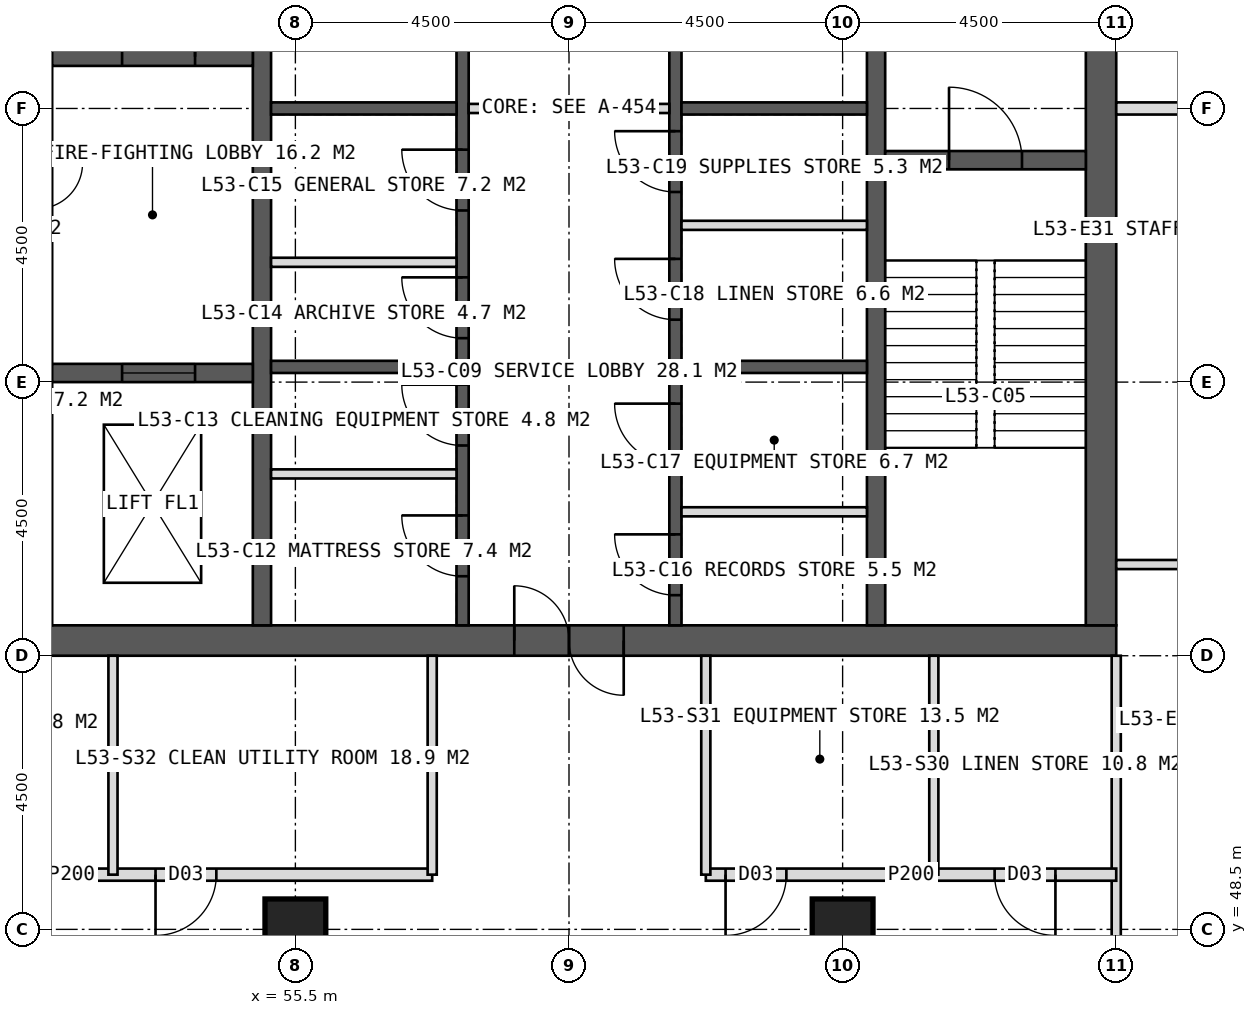
"""IFC4 building model, lengths in metres.
Left out: names, types, materials, properties, quantities, classifications, styles, units other than length and angle.
Written with IfcOpenShell. Run it as: python <this file> out.ifc"""

import sys

from ifc_helpers import new_model, si_unit, direction, frame, frame_2d, origin, origin_2d, place, context, subcontext, project, spatial, rectangle, hollow_rectangle, extrude, element, fill, save


model = new_model("IFC4")
c1 = context("Model", 3, precision=1e-05, world=origin(), true_north=direction((0.0, 1.0)))
c2 = subcontext(c1, "Body", "Model", "MODEL_VIEW")
j1 = project(units=[si_unit("LENGTHUNIT", "METRE"), si_unit("PLANEANGLEUNIT", "RADIAN")], contexts=[c1])
p1 = place(None, origin())
s1 = spatial("IfcSite", under=j1, at=p1, CompositionType="ELEMENT")
p2 = place(p1, origin())
s2 = spatial("IfcBuilding", under=s1, at=p2, CompositionType="ELEMENT")
p3 = place(p2, frame((0.0, 0.0, 221.0)))
s3 = spatial("IfcBuildingStorey", under=s2, at=p3, CompositionType="ELEMENT", Elevation=221.0)
p4 = place(p3, frame((51.0, 53.25, 0.0), z_axis=(0.0, 0.0, 1.0), x_axis=(1.0, 0.0, 0.0)))
e1 = element("IfcWall", 1, at=p4, inside=s3, PredefinedType="SHEAR", context=c2, shape_type="SweptSolid", body=[
    extrude(rectangle(XDim=18.0, YDim=0.5, at=frame_2d((9.0, 0.0))), origin(), (0.0, 0.0, 1.0), 4.0),
])
p5 = place(p4, frame((8.1, 0.0, 0.0)))
e2 = element("IfcOpeningElement", 2, at=p5, cuts=e1, PredefinedType="OPENING", context=c2, shape_type="SweptSolid", body=[
    extrude(rectangle(XDim=1.8, YDim=2.2, at=frame_2d((0.9, 1.1))), frame((0.0, 0.26, 0.0), z_axis=(0.0, -1.0, 0.0), x_axis=(1.0, 0.0, 0.0)), (0.0, 0.0, 1.0), 0.52),
])
p6 = place(p3, frame((68.75, 53.5, 0.0), z_axis=(0.0, 0.0, 1.0), x_axis=(0.0, 1.0, 0.0)))
e3 = element("IfcWall", 3, at=p6, inside=s3, PredefinedType="SHEAR", context=c2, shape_type="SweptSolid", body=[
    extrude(rectangle(XDim=17.0, YDim=0.5, at=frame_2d((8.5, 0.0))), origin(), (0.0, 0.0, 1.0), 4.0),
])
p7 = place(p6, frame((9.6, 0.0, 0.0)))
e4 = element("IfcOpeningElement", 4, at=p7, cuts=e3, PredefinedType="OPENING", context=c2, shape_type="SweptSolid", body=[
    extrude(rectangle(XDim=1.5, YDim=2.2, at=frame_2d((0.75, 1.1))), frame((0.0, 0.26, 0.0), z_axis=(0.0, -1.0, 0.0), x_axis=(1.0, 0.0, 0.0)), (0.0, 0.0, 1.0), 0.52),
])
for number, where, z_axis, x_axis in (
    (5, (54.95, 53.5, 0.0), (0.0, 0.0, 1.0), (0.0, 1.0, 0.0)),
    (6, (65.05, 53.5, 0.0), (0.0, 0.0, 1.0), (0.0, 1.0, 0.0)),
):
    element("IfcWall", number, at=place(p3, frame(where, z_axis=z_axis, x_axis=x_axis)), inside=s3, PredefinedType="SHEAR", context=c2, shape_type="SweptSolid", body=[
        extrude(rectangle(XDim=17.0, YDim=0.3, at=frame_2d((8.5, 0.0))), origin(), (0.0, 0.0, 1.0), 4.0),
    ])
p8 = place(p3, frame((58.25, 53.5, 0.0), z_axis=(0.0, 0.0, 1.0), x_axis=(0.0, 1.0, 0.0)))
e7 = element("IfcWall", 7, at=p8, inside=s3, PredefinedType="SHEAR", context=c2, shape_type="SweptSolid", body=[
    extrude(rectangle(XDim=17.0, YDim=0.2, at=frame_2d((8.5, 0.0))), origin(), (0.0, 0.0, 1.0), 4.0),
])
p9 = place(p8, frame((0.808, 0.0, 0.0)))
e8 = element("IfcOpeningElement", 8, at=p9, cuts=e7, PredefinedType="OPENING", context=c2, shape_type="SweptSolid", body=[
    extrude(rectangle(XDim=1.0, YDim=2.1, at=frame_2d((0.5, 1.05))), frame((0.0, 0.11, 0.0), z_axis=(0.0, -1.0, 0.0), x_axis=(1.0, 0.0, 0.0)), (0.0, 0.0, 1.0), 0.22),
])
p10 = place(p8, frame((2.958, 0.0, 0.0)))
e9 = element("IfcOpeningElement", 9, at=p10, cuts=e7, PredefinedType="OPENING", context=c2, shape_type="SweptSolid", body=[
    extrude(rectangle(XDim=1.0, YDim=2.1, at=frame_2d((0.5, 1.05))), frame((0.0, 0.11, 0.0), z_axis=(0.0, -1.0, 0.0), x_axis=(1.0, 0.0, 0.0)), (0.0, 0.0, 1.0), 0.22),
])
p11 = place(p8, frame((4.722, 0.0, 0.0)))
e10 = element("IfcOpeningElement", 10, at=p11, cuts=e7, PredefinedType="OPENING", context=c2, shape_type="SweptSolid", body=[
    extrude(rectangle(XDim=1.0, YDim=2.1, at=frame_2d((0.5, 1.05))), frame((0.0, 0.11, 0.0), z_axis=(0.0, -1.0, 0.0), x_axis=(1.0, 0.0, 0.0)), (0.0, 0.0, 1.0), 0.22),
])
p12 = place(p8, frame((6.823, 0.0, 0.0)))
e11 = element("IfcOpeningElement", 11, at=p12, cuts=e7, PredefinedType="OPENING", context=c2, shape_type="SweptSolid", body=[
    extrude(rectangle(XDim=1.0, YDim=2.1, at=frame_2d((0.5, 1.05))), frame((0.0, 0.11, 0.0), z_axis=(0.0, -1.0, 0.0), x_axis=(1.0, 0.0, 0.0)), (0.0, 0.0, 1.0), 0.22),
])
p13 = place(p8, frame((10.025, 0.0, 0.0)))
e12 = element("IfcOpeningElement", 12, at=p13, cuts=e7, PredefinedType="OPENING", context=c2, shape_type="SweptSolid", body=[
    extrude(rectangle(XDim=1.4, YDim=2.2, at=frame_2d((0.7, 1.1))), frame((0.0, 0.11, 0.0), z_axis=(0.0, -1.0, 0.0), x_axis=(1.0, 0.0, 0.0)), (0.0, 0.0, 1.0), 0.22),
])
p14 = place(p8, frame((14.325, 0.0, 0.0)))
e13 = element("IfcOpeningElement", 13, at=p14, cuts=e7, PredefinedType="OPENING", context=c2, shape_type="SweptSolid", body=[
    extrude(rectangle(XDim=1.4, YDim=2.2, at=frame_2d((0.7, 1.1))), frame((0.0, 0.11, 0.0), z_axis=(0.0, -1.0, 0.0), x_axis=(1.0, 0.0, 0.0)), (0.0, 0.0, 1.0), 0.22),
])
p15 = place(p3, frame((61.75, 53.5, 0.0), z_axis=(0.0, 0.0, 1.0), x_axis=(0.0, 1.0, 0.0)))
e14 = element("IfcWall", 14, at=p15, inside=s3, PredefinedType="SHEAR", context=c2, shape_type="SweptSolid", body=[
    extrude(rectangle(XDim=17.0, YDim=0.2, at=frame_2d((8.5, 0.0))), origin(), (0.0, 0.0, 1.0), 4.0),
])
p16 = place(p15, frame((0.496, 0.0, 0.0)))
e15 = element("IfcOpeningElement", 15, at=p16, cuts=e14, PredefinedType="OPENING", context=c2, shape_type="SweptSolid", body=[
    extrude(rectangle(XDim=1.0, YDim=2.1, at=frame_2d((0.5, 1.05))), frame((0.0, 0.11, 0.0), z_axis=(0.0, -1.0, 0.0), x_axis=(1.0, 0.0, 0.0)), (0.0, 0.0, 1.0), 0.22),
])
p17 = place(p15, frame((2.646, 0.0, 0.0)))
e16 = element("IfcOpeningElement", 16, at=p17, cuts=e14, PredefinedType="OPENING", context=c2, shape_type="SweptSolid", body=[
    extrude(rectangle(XDim=1.0, YDim=2.1, at=frame_2d((0.5, 1.05))), frame((0.0, 0.11, 0.0), z_axis=(0.0, -1.0, 0.0), x_axis=(1.0, 0.0, 0.0)), (0.0, 0.0, 1.0), 0.22),
])
p18 = place(p15, frame((5.027, 0.0, 0.0)))
e17 = element("IfcOpeningElement", 17, at=p18, cuts=e14, PredefinedType="OPENING", context=c2, shape_type="SweptSolid", body=[
    extrude(rectangle(XDim=1.0, YDim=2.1, at=frame_2d((0.5, 1.05))), frame((0.0, 0.11, 0.0), z_axis=(0.0, -1.0, 0.0), x_axis=(1.0, 0.0, 0.0)), (0.0, 0.0, 1.0), 0.22),
])
p19 = place(p15, frame((7.126, 0.0, 0.0)))
e18 = element("IfcOpeningElement", 18, at=p19, cuts=e14, PredefinedType="OPENING", context=c2, shape_type="SweptSolid", body=[
    extrude(rectangle(XDim=1.0, YDim=2.1, at=frame_2d((0.5, 1.05))), frame((0.0, 0.11, 0.0), z_axis=(0.0, -1.0, 0.0), x_axis=(1.0, 0.0, 0.0)), (0.0, 0.0, 1.0), 0.22),
])
p20 = place(p15, frame((10.025, 0.0, 0.0)))
e19 = element("IfcOpeningElement", 19, at=p20, cuts=e14, PredefinedType="OPENING", context=c2, shape_type="SweptSolid", body=[
    extrude(rectangle(XDim=1.4, YDim=2.2, at=frame_2d((0.7, 1.1))), frame((0.0, 0.11, 0.0), z_axis=(0.0, -1.0, 0.0), x_axis=(1.0, 0.0, 0.0)), (0.0, 0.0, 1.0), 0.22),
])
p21 = place(p15, frame((14.325, 0.0, 0.0)))
e20 = element("IfcOpeningElement", 20, at=p21, cuts=e14, PredefinedType="OPENING", context=c2, shape_type="SweptSolid", body=[
    extrude(rectangle(XDim=1.4, YDim=2.2, at=frame_2d((0.7, 1.1))), frame((0.0, 0.11, 0.0), z_axis=(0.0, -1.0, 0.0), x_axis=(1.0, 0.0, 0.0)), (0.0, 0.0, 1.0), 0.22),
])
for number, where, z_axis, x_axis in (
    (21, (55.1, 57.75, 0.0), (0.0, 0.0, 1.0), (1.0, 0.0, 0.0)),
    (22, (61.85, 57.75, 0.0), (0.0, 0.0, 1.0), (1.0, 0.0, 0.0)),
    (23, (55.1, 62.0, 0.0), (0.0, 0.0, 1.0), (1.0, 0.0, 0.0)),
    (24, (61.85, 62.0, 0.0), (0.0, 0.0, 1.0), (1.0, 0.0, 0.0)),
):
    element("IfcWall", number, at=place(p3, frame(where, z_axis=z_axis, x_axis=x_axis)), inside=s3, PredefinedType="SHEAR", context=c2, shape_type="SweptSolid", body=[
        extrude(rectangle(XDim=3.05, YDim=0.2, at=frame_2d((1.525, 0.0))), origin(), (0.0, 0.0, 1.0), 4.0),
    ])
p22 = place(p3, frame((51.5, 62.85, 0.0), z_axis=(0.0, 0.0, 1.0), x_axis=(1.0, 0.0, 0.0)))
e25 = element("IfcWall", 25, at=p22, inside=s3, PredefinedType="SHEAR", context=c2, shape_type="SweptSolid", body=[
    extrude(rectangle(XDim=3.3, YDim=0.3, at=frame_2d((1.65, 0.0))), origin(), (0.0, 0.0, 1.0), 4.0),
])
p23 = place(p22, frame((1.15, 0.0, 0.0)))
e26 = element("IfcOpeningElement", 26, at=p23, cuts=e25, PredefinedType="OPENING", context=c2, shape_type="SweptSolid", body=[
    extrude(rectangle(XDim=1.2, YDim=2.1, at=frame_2d((0.6, 1.05))), frame((0.0, 0.16, 0.0), z_axis=(0.0, -1.0, 0.0), x_axis=(1.0, 0.0, 0.0)), (0.0, 0.0, 1.0), 0.32),
])
p24 = place(p3, frame((51.5, 57.65, 0.0), z_axis=(0.0, 0.0, 1.0), x_axis=(1.0, 0.0, 0.0)))
e27 = element("IfcWall", 27, at=p24, inside=s3, PredefinedType="SHEAR", context=c2, shape_type="SweptSolid", body=[
    extrude(rectangle(XDim=3.3, YDim=0.3, at=frame_2d((1.65, 0.0))), origin(), (0.0, 0.0, 1.0), 4.0),
])
p25 = place(p24, frame((1.15, 0.0, 0.0)))
e28 = element("IfcOpeningElement", 28, at=p25, cuts=e27, PredefinedType="OPENING", context=c2, shape_type="SweptSolid", body=[
    extrude(rectangle(XDim=1.2, YDim=2.2, at=frame_2d((0.6, 1.1))), frame((0.0, 0.16, 0.0), z_axis=(0.0, -1.0, 0.0), x_axis=(1.0, 0.0, 0.0)), (0.0, 0.0, 1.0), 0.32),
])
p26 = place(p3, frame((65.2, 61.15, 0.0), z_axis=(0.0, 0.0, 1.0), x_axis=(1.0, 0.0, 0.0)))
e29 = element("IfcWall", 29, at=p26, inside=s3, PredefinedType="SHEAR", context=c2, shape_type="SweptSolid", body=[
    extrude(rectangle(XDim=3.3, YDim=0.3, at=frame_2d((1.65, 0.0))), origin(), (0.0, 0.0, 1.0), 4.0),
])
p27 = place(p26, frame((1.05, 0.0, 0.0)))
e30 = element("IfcOpeningElement", 30, at=p27, cuts=e29, PredefinedType="OPENING", context=c2, shape_type="SweptSolid", body=[
    extrude(rectangle(XDim=1.2, YDim=2.1, at=frame_2d((0.6, 1.05))), frame((0.0, 0.16, 0.0), z_axis=(0.0, -1.0, 0.0), x_axis=(1.0, 0.0, 0.0)), (0.0, 0.0, 1.0), 0.32),
])
for number, where, z_axis, x_axis in (
    (31, (55.5, 48.5, 0.0), (0.0, 0.0, 1.0), (1.0, 0.0, 0.0)),
    (32, (64.5, 48.5, 0.0), (0.0, 0.0, 1.0), (1.0, 0.0, 0.0)),
):
    element("IfcColumn", number, at=place(p3, frame(where, z_axis=z_axis, x_axis=x_axis)), inside=s3, PredefinedType="COLUMN", context=c2, shape_type="SweptSolid", body=[
        extrude(hollow_rectangle(XDim=1.0, YDim=1.0, WallThickness=0.1, at=origin_2d()), origin(), (0.0, 0.0, 1.0), 4.0),
    ])
p28 = place(p3, frame((69.0, 53.0, 0.0), z_axis=(0.0, 0.0, 1.0), x_axis=(0.0, -1.0, 0.0)))
e33 = element("IfcWall", 33, at=p28, inside=s3, PredefinedType="PARTITIONING", context=c2, shape_type="SweptSolid", body=[
    extrude(rectangle(XDim=5.1, YDim=0.15, at=frame_2d((2.55, 0.0))), origin(), (0.0, 0.0, 1.0), 3.75),
])
p29 = place(p3, frame((69.0, 49.4, 0.0), z_axis=(0.0, 0.0, 1.0), x_axis=(-1.0, 0.0, 0.0)))
e34 = element("IfcWall", 34, at=p29, inside=s3, PredefinedType="PARTITIONING", context=c2, shape_type="SweptSolid", body=[
    extrude(rectangle(XDim=6.75, YDim=0.2, at=frame_2d((3.375, 0.0))), origin(), (0.0, 0.0, 1.0), 3.75),
])
p30 = place(p29, frame((1.0, 0.0, 0.0)))
e35 = element("IfcOpeningElement", 35, at=p30, cuts=e34, PredefinedType="OPENING", context=c2, shape_type="SweptSolid", body=[
    extrude(rectangle(XDim=1.0, YDim=2.1, at=frame_2d((0.5, 1.05))), frame((0.0, 0.11, 0.0), z_axis=(0.0, -1.0, 0.0), x_axis=(1.0, 0.0, 0.0)), (0.0, 0.0, 1.0), 0.22),
])
p31 = place(p29, frame((5.425, 0.0, 0.0)))
e36 = element("IfcOpeningElement", 36, at=p31, cuts=e34, PredefinedType="OPENING", context=c2, shape_type="SweptSolid", body=[
    extrude(rectangle(XDim=1.0, YDim=2.1, at=frame_2d((0.5, 1.05))), frame((0.0, 0.11, 0.0), z_axis=(0.0, -1.0, 0.0), x_axis=(1.0, 0.0, 0.0)), (0.0, 0.0, 1.0), 0.22),
])
p32 = place(p3, frame((57.75, 49.4, 0.0), z_axis=(0.0, 0.0, 1.0), x_axis=(-1.0, 0.0, 0.0)))
e37 = element("IfcWall", 37, at=p32, inside=s3, PredefinedType="PARTITIONING", context=c2, shape_type="SweptSolid", body=[
    extrude(rectangle(XDim=11.85, YDim=0.2, at=frame_2d((5.925, 0.0))), origin(), (0.0, 0.0, 1.0), 3.75),
])
p33 = place(p32, frame((3.55, 0.0, 0.0)))
e38 = element("IfcOpeningElement", 38, at=p33, cuts=e37, PredefinedType="OPENING", context=c2, shape_type="SweptSolid", body=[
    extrude(rectangle(XDim=1.0, YDim=2.1, at=frame_2d((0.5, 1.05))), frame((0.0, 0.11, 0.0), z_axis=(0.0, -1.0, 0.0), x_axis=(1.0, 0.0, 0.0)), (0.0, 0.0, 1.0), 0.22),
])
p34 = place(p32, frame((8.05, 0.0, 0.0)))
e39 = element("IfcOpeningElement", 39, at=p34, cuts=e37, PredefinedType="OPENING", context=c2, shape_type="SweptSolid", body=[
    extrude(rectangle(XDim=1.0, YDim=2.1, at=frame_2d((0.5, 1.05))), frame((0.0, 0.11, 0.0), z_axis=(0.0, -1.0, 0.0), x_axis=(1.0, 0.0, 0.0)), (0.0, 0.0, 1.0), 0.22),
])
for number, where, z_axis, x_axis in (
    (40, (62.25, 53.0, 0.0), (0.0, 0.0, 1.0), (0.0, -1.0, 0.0)),
    (41, (57.75, 53.0, 0.0), (0.0, 0.0, 1.0), (0.0, -1.0, 0.0)),
    (42, (66.0, 53.0, 0.0), (0.0, 0.0, 1.0), (0.0, -1.0, 0.0)),
    (43, (52.5, 53.0, 0.0), (0.0, 0.0, 1.0), (0.0, -1.0, 0.0)),
):
    element("IfcWall", number, at=place(p3, frame(where, z_axis=z_axis, x_axis=x_axis)), inside=s3, PredefinedType="PARTITIONING", context=c2, shape_type="SweptSolid", body=[
        extrude(rectangle(XDim=3.6, YDim=0.15, at=frame_2d((1.8, 0.0))), origin(), (0.0, 0.0, 1.0), 3.75),
    ])
p35 = place(p3, frame((69.0, 62.0, 0.0), z_axis=(0.0, 0.0, 1.0), x_axis=(1.0, 0.0, 0.0)))
e44 = element("IfcWall", 44, at=p35, inside=s3, PredefinedType="SOLIDWALL", context=c2, shape_type="SweptSolid", body=[
    extrude(rectangle(XDim=5.1, YDim=0.2, at=frame_2d((2.55, 0.0))), origin(), (0.0, 0.0, 1.0), 2.95),
])
p36 = place(p3, frame((69.0, 54.5, 0.0), z_axis=(0.0, 0.0, 1.0), x_axis=(1.0, 0.0, 0.0)))
e45 = element("IfcWall", 45, at=p36, inside=s3, PredefinedType="PARTITIONING", context=c2, shape_type="SweptSolid", body=[
    extrude(rectangle(XDim=5.1, YDim=0.15, at=frame_2d((2.55, 0.0))), origin(), (0.0, 0.0, 1.0), 3.75),
])
for number, where, z_axis, x_axis in (
    (46, (55.1, 55.99, 0.0), (0.0, 0.0, 1.0), (1.0, 0.0, 0.0)),
    (47, (61.85, 55.367, 0.0), (0.0, 0.0, 1.0), (1.0, 0.0, 0.0)),
    (48, (55.1, 59.47, 0.0), (0.0, 0.0, 1.0), (1.0, 0.0, 0.0)),
    (49, (61.85, 60.078, 0.0), (0.0, 0.0, 1.0), (1.0, 0.0, 0.0)),
):
    element("IfcWall", number, at=place(p3, frame(where, z_axis=z_axis, x_axis=x_axis)), inside=s3, PredefinedType="PARTITIONING", context=c2, shape_type="SweptSolid", body=[
        extrude(rectangle(XDim=3.05, YDim=0.15, at=frame_2d((1.525, 0.0))), origin(), (0.0, 0.0, 1.0), 3.75),
    ])
p37 = place(p3, frame((58.35, 62.0, 0.0), z_axis=(0.0, 0.0, 1.0), x_axis=(1.0, 0.0, 0.0)))
e50 = element("IfcWall", 50, at=p37, inside=s3, PredefinedType="PARTITIONING", context=c2, shape_type="SweptSolid", body=[
    extrude(rectangle(XDim=3.3, YDim=0.15, at=frame_2d((1.65, 0.0))), origin(), (0.0, 0.0, 1.0), 3.75),
])
p38 = place(p30, origin())
e51 = element("IfcDoor", 51, at=p38, inside=s3, OperationType="SINGLE_SWING_LEFT", PredefinedType="DOOR", context=c2, shape_type="SweptSolid", body=[
    extrude(rectangle(XDim=1.0, YDim=2.1, at=frame_2d((0.5, 1.05))), frame((0.0, 0.025, 0.0), z_axis=(0.0, -1.0, 0.0), x_axis=(1.0, 0.0, 0.0)), (0.0, 0.0, 1.0), 0.05),
])
fill(e35, e51)
p39 = place(p31, origin())
e52 = element("IfcDoor", 52, at=p39, inside=s3, OperationType="SINGLE_SWING_RIGHT", PredefinedType="DOOR", context=c2, shape_type="SweptSolid", body=[
    extrude(rectangle(XDim=1.0, YDim=2.1, at=frame_2d((0.5, 1.05))), frame((0.0, 0.025, 0.0), z_axis=(0.0, -1.0, 0.0), x_axis=(1.0, 0.0, 0.0)), (0.0, 0.0, 1.0), 0.05),
])
fill(e36, e52)
p40 = place(p33, origin())
e53 = element("IfcDoor", 53, at=p40, inside=s3, OperationType="SINGLE_SWING_RIGHT", PredefinedType="DOOR", context=c2, shape_type="SweptSolid", body=[
    extrude(rectangle(XDim=1.0, YDim=2.1, at=frame_2d((0.5, 1.05))), frame((0.0, 0.025, 0.0), z_axis=(0.0, -1.0, 0.0), x_axis=(1.0, 0.0, 0.0)), (0.0, 0.0, 1.0), 0.05),
])
fill(e38, e53)
p41 = place(p23, origin())
e54 = element("IfcDoor", 54, at=p41, inside=s3, OperationType="SINGLE_SWING_RIGHT", PredefinedType="DOOR", context=c2, shape_type="SweptSolid", body=[
    extrude(rectangle(XDim=1.2, YDim=2.1, at=frame_2d((0.6, 1.05))), frame((0.0, 0.025, 0.0), z_axis=(0.0, -1.0, 0.0), x_axis=(1.0, 0.0, 0.0)), (0.0, 0.0, 1.0), 0.05),
])
fill(e26, e54)
p42 = place(p27, origin())
e55 = element("IfcDoor", 55, at=p42, inside=s3, OperationType="SINGLE_SWING_LEFT", PredefinedType="DOOR", context=c2, shape_type="SweptSolid", body=[
    extrude(rectangle(XDim=1.2, YDim=2.1, at=frame_2d((0.6, 1.05))), frame((0.0, 0.025, 0.0), z_axis=(0.0, -1.0, 0.0), x_axis=(1.0, 0.0, 0.0)), (0.0, 0.0, 1.0), 0.05),
])
fill(e30, e55)
p43 = place(p25, origin())
e56 = element("IfcDoor", 56, at=p43, inside=s3, OperationType="SLIDING_TO_LEFT", PredefinedType="DOOR", context=c2, shape_type="SweptSolid", body=[
    extrude(rectangle(XDim=1.2, YDim=2.2, at=frame_2d((0.6, 1.1))), frame((0.0, 0.025, 0.0), z_axis=(0.0, -1.0, 0.0), x_axis=(1.0, 0.0, 0.0)), (0.0, 0.0, 1.0), 0.05),
])
fill(e28, e56)
p44 = place(p9, origin())
e57 = element("IfcDoor", 57, at=p44, inside=s3, OperationType="SINGLE_SWING_RIGHT", PredefinedType="DOOR", context=c2, shape_type="SweptSolid", body=[
    extrude(rectangle(XDim=1.0, YDim=2.1, at=frame_2d((0.5, 1.05))), frame((0.0, 0.025, 0.0), z_axis=(0.0, -1.0, 0.0), x_axis=(1.0, 0.0, 0.0)), (0.0, 0.0, 1.0), 0.05),
])
fill(e8, e57)
p45 = place(p10, origin())
e58 = element("IfcDoor", 58, at=p45, inside=s3, OperationType="SINGLE_SWING_RIGHT", PredefinedType="DOOR", context=c2, shape_type="SweptSolid", body=[
    extrude(rectangle(XDim=1.0, YDim=2.1, at=frame_2d((0.5, 1.05))), frame((0.0, 0.025, 0.0), z_axis=(0.0, -1.0, 0.0), x_axis=(1.0, 0.0, 0.0)), (0.0, 0.0, 1.0), 0.05),
])
fill(e9, e58)
p46 = place(p16, origin())
e59 = element("IfcDoor", 59, at=p46, inside=s3, OperationType="SINGLE_SWING_RIGHT", PredefinedType="DOOR", context=c2, shape_type="SweptSolid", body=[
    extrude(rectangle(XDim=1.0, YDim=2.1, at=frame_2d((0.5, 1.05))), frame((0.0, 0.025, 0.0), z_axis=(0.0, -1.0, 0.0), x_axis=(1.0, 0.0, 0.0)), (0.0, 0.0, 1.0), 0.05),
])
fill(e15, e59)
p47 = place(p17, origin())
e60 = element("IfcDoor", 60, at=p47, inside=s3, OperationType="SINGLE_SWING_RIGHT", PredefinedType="DOOR", context=c2, shape_type="SweptSolid", body=[
    extrude(rectangle(XDim=1.0, YDim=2.1, at=frame_2d((0.5, 1.05))), frame((0.0, 0.025, 0.0), z_axis=(0.0, -1.0, 0.0), x_axis=(1.0, 0.0, 0.0)), (0.0, 0.0, 1.0), 0.05),
])
fill(e16, e60)
p48 = place(p11, origin())
e61 = element("IfcDoor", 61, at=p48, inside=s3, OperationType="SINGLE_SWING_RIGHT", PredefinedType="DOOR", context=c2, shape_type="SweptSolid", body=[
    extrude(rectangle(XDim=1.0, YDim=2.1, at=frame_2d((0.5, 1.05))), frame((0.0, 0.025, 0.0), z_axis=(0.0, -1.0, 0.0), x_axis=(1.0, 0.0, 0.0)), (0.0, 0.0, 1.0), 0.05),
])
fill(e10, e61)
p49 = place(p12, origin())
e62 = element("IfcDoor", 62, at=p49, inside=s3, OperationType="SINGLE_SWING_RIGHT", PredefinedType="DOOR", context=c2, shape_type="SweptSolid", body=[
    extrude(rectangle(XDim=1.0, YDim=2.1, at=frame_2d((0.5, 1.05))), frame((0.0, 0.025, 0.0), z_axis=(0.0, -1.0, 0.0), x_axis=(1.0, 0.0, 0.0)), (0.0, 0.0, 1.0), 0.05),
])
fill(e11, e62)
p50 = place(p18, origin())
e63 = element("IfcDoor", 63, at=p50, inside=s3, OperationType="SINGLE_SWING_RIGHT", PredefinedType="DOOR", context=c2, shape_type="SweptSolid", body=[
    extrude(rectangle(XDim=1.0, YDim=2.1, at=frame_2d((0.5, 1.05))), frame((0.0, 0.025, 0.0), z_axis=(0.0, -1.0, 0.0), x_axis=(1.0, 0.0, 0.0)), (0.0, 0.0, 1.0), 0.05),
])
fill(e17, e63)
p51 = place(p19, origin())
e64 = element("IfcDoor", 64, at=p51, inside=s3, OperationType="SINGLE_SWING_RIGHT", PredefinedType="DOOR", context=c2, shape_type="SweptSolid", body=[
    extrude(rectangle(XDim=1.0, YDim=2.1, at=frame_2d((0.5, 1.05))), frame((0.0, 0.025, 0.0), z_axis=(0.0, -1.0, 0.0), x_axis=(1.0, 0.0, 0.0)), (0.0, 0.0, 1.0), 0.05),
])
fill(e18, e64)
p52 = place(p5, origin())
e65 = element("IfcDoor", 65, at=p52, inside=s3, OperationType="DOUBLE_DOOR_SINGLE_SWING", PredefinedType="DOOR", context=c2, shape_type="SweptSolid", body=[
    extrude(rectangle(XDim=1.8, YDim=2.2, at=frame_2d((0.9, 1.1))), frame((0.0, 0.025, 0.0), z_axis=(0.0, -1.0, 0.0), x_axis=(1.0, 0.0, 0.0)), (0.0, 0.0, 1.0), 0.05),
])
fill(e2, e65)
save(model, sys.argv[1])
